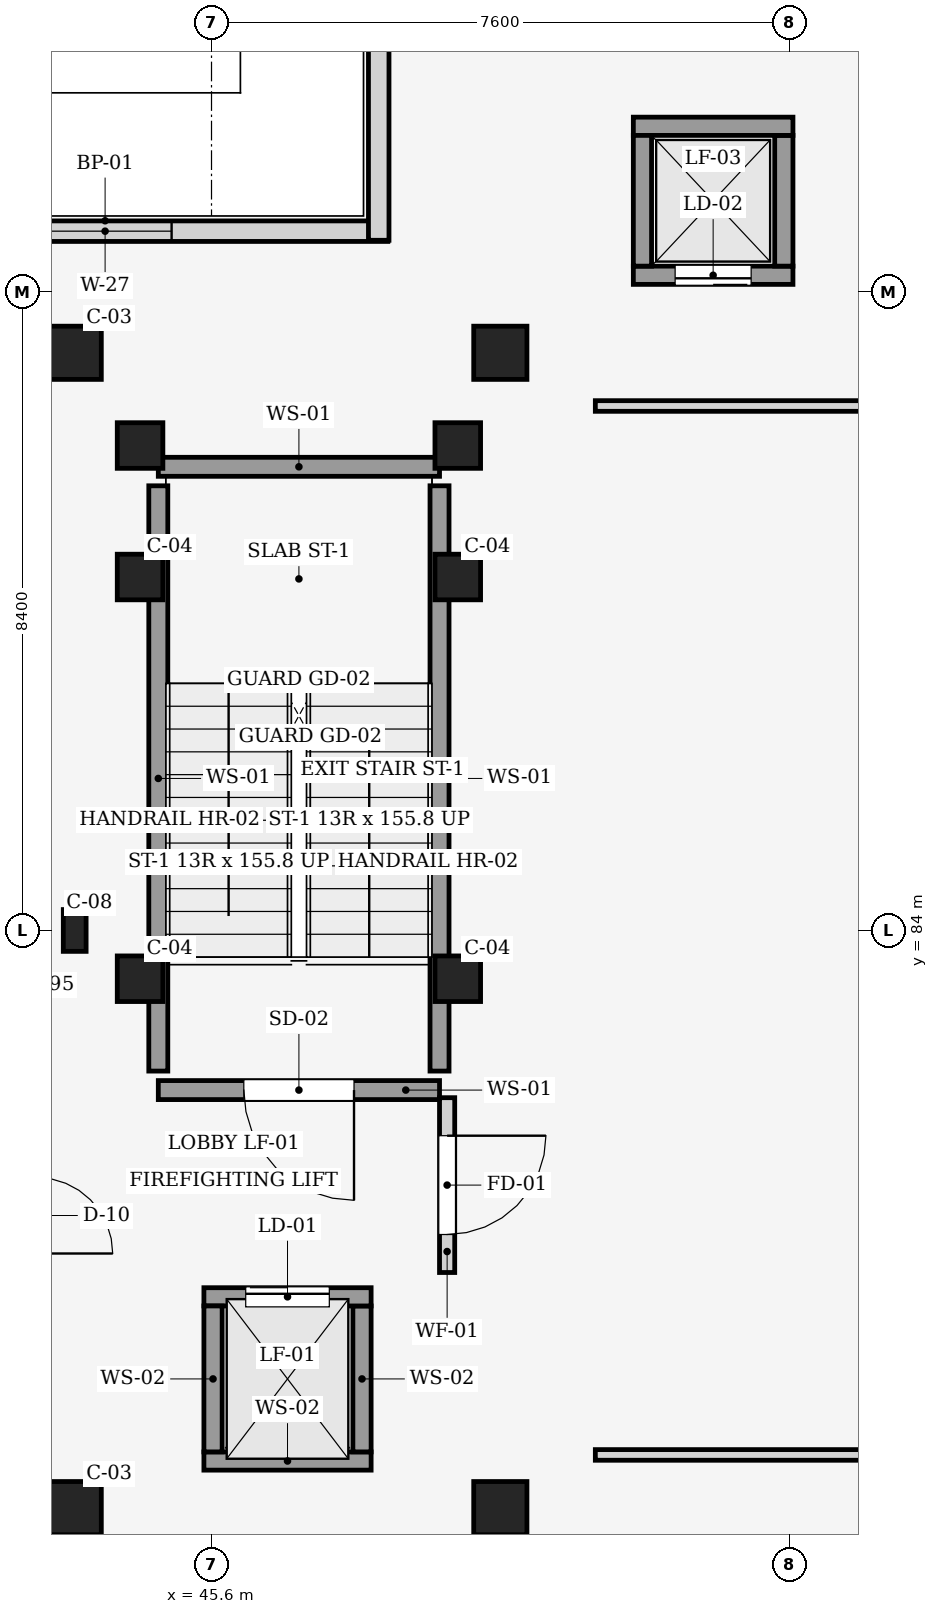
"""IFC4 building model, lengths in metres.
Left out: names, types, materials, properties, quantities, classifications, styles, units other than length and angle.
Written with IfcOpenShell. Run it as: python <this file> out.ifc"""

import sys

from ifc_helpers import new_model, si_unit, direction, frame, frame_2d, origin, origin_2d, place, context, subcontext, project, spatial, rectangle, i_section, extrude, element, fill, save


model = new_model("IFC4")
c1 = context("Model", 3, precision=1e-05, world=origin(), true_north=direction((0.0, 1.0)))
c2 = subcontext(c1, "Body", "Model", "MODEL_VIEW")
j1 = project(units=[si_unit("LENGTHUNIT", "METRE"), si_unit("PLANEANGLEUNIT", "RADIAN")], contexts=[c1])
p1 = place(None, origin())
s1 = spatial("IfcSite", under=j1, at=p1, CompositionType="ELEMENT")
p2 = place(p1, origin())
s2 = spatial("IfcBuilding", under=s1, at=p2, CompositionType="ELEMENT")
p3 = place(p2, frame((0.0, 0.0, 21.3)))
s3 = spatial("IfcBuildingStorey", under=s2, at=p3, CompositionType="ELEMENT", Elevation=21.3)
for number, where, z_axis, x_axis in (
    (1, (43.8, 76.4, 0.0), (0.0, 0.0, 1.0), (1.0, 0.0, 0.0)),
    (2, (43.8, 91.6, 0.0), (0.0, 0.0, 1.0), (1.0, 0.0, 0.0)),
    (3, (49.4, 76.4, 0.0), (0.0, 0.0, 1.0), (1.0, 0.0, 0.0)),
    (4, (49.4, 91.6, 0.0), (0.0, 0.0, 1.0), (1.0, 0.0, 0.0)),
):
    element("IfcColumn", number, at=place(p3, frame(where, z_axis=z_axis, x_axis=x_axis)), inside=s3, PredefinedType="COLUMN", context=c2, shape_type="SweptSolid", body=[
        extrude(rectangle(XDim=0.7, YDim=0.7, at=origin_2d()), origin(), (0.0, 0.0, 1.0), 4.05),
    ])
p4 = place(p3, frame((43.8, 84.0, 0.0), z_axis=(0.0, 0.0, 1.0), x_axis=(1.0, 0.0, 0.0)))
e5 = element("IfcColumn", 5, at=p4, inside=s3, PredefinedType="COLUMN", context=c2, shape_type="SweptSolid", body=[
    extrude(i_section(OverallWidth=0.3, OverallDepth=0.55, WebThickness=0.015, FlangeThickness=0.029, at=origin_2d()), origin(), (0.0, 0.0, 1.0), 4.05),
])
for number, where, z_axis, x_axis in (
    (6, (48.84, 83.365, 0.0), (0.0, 0.0, 1.0), (1.0, 0.0, 0.0)),
    (7, (44.66, 83.365, 0.0), (0.0, 0.0, 1.0), (1.0, 0.0, 0.0)),
    (8, (48.84, 88.65, 0.0), (0.0, 0.0, 1.0), (1.0, 0.0, 0.0)),
    (9, (44.66, 88.65, 0.0), (0.0, 0.0, 1.0), (1.0, 0.0, 0.0)),
    (10, (48.84, 90.38, 0.0), (0.0, 0.0, 1.0), (1.0, 0.0, 0.0)),
    (11, (44.66, 90.38, 0.0), (0.0, 0.0, 1.0), (1.0, 0.0, 0.0)),
):
    element("IfcColumn", number, at=place(p3, frame(where, z_axis=z_axis, x_axis=x_axis)), inside=s3, PredefinedType="COLUMN", context=c2, shape_type="SweptSolid", body=[
        extrude(rectangle(XDim=0.6, YDim=0.6, at=origin_2d()), origin(), (0.0, 0.0, 1.0), 4.05),
    ])
p5 = place(p3, frame((40.48, 93.2, 0.0), z_axis=(0.0, 0.0, 1.0), x_axis=(1.0, 0.0, 0.0)))
e12 = element("IfcWall", 12, at=p5, inside=s3, PredefinedType="STANDARD", context=c2, shape_type="SweptSolid", body=[
    extrude(rectangle(XDim=7.44, YDim=0.27, at=frame_2d((3.72, 0.0))), origin(), (0.0, 0.0, 1.0), 3.015),
])
p6 = place(p5, frame((2.845, 0.0, 0.85)))
e13 = element("IfcOpeningElement", 13, at=p6, cuts=e12, PredefinedType="OPENING", context=c2, shape_type="SweptSolid", body=[
    extrude(rectangle(XDim=1.75, YDim=1.85, at=frame_2d((0.875, 0.925))), frame((0.0, 0.145, 0.0), z_axis=(0.0, -1.0, 0.0), x_axis=(1.0, 0.0, 0.0)), (0.0, 0.0, 1.0), 0.29),
])
p7 = place(p3, frame((47.8, 93.08, 0.0), z_axis=(0.0, 0.0, 1.0), x_axis=(0.0, 1.0, 0.0)))
e14 = element("IfcWall", 14, at=p7, inside=s3, PredefinedType="STANDARD", context=c2, shape_type="SweptSolid", body=[
    extrude(rectangle(XDim=7.44, YDim=0.27, at=frame_2d((3.72, 0.0))), origin(), (0.0, 0.0, 1.0), 3.015),
])
p8 = place(p7, frame((2.72, 0.0, 0.85)))
e15 = element("IfcOpeningElement", 15, at=p8, cuts=e14, PredefinedType="OPENING", context=c2, shape_type="SweptSolid", body=[
    extrude(rectangle(XDim=2.0, YDim=1.85, at=frame_2d((1.0, 0.925))), frame((0.0, 0.145, 0.0), z_axis=(0.0, -1.0, 0.0), x_axis=(1.0, 0.0, 0.0)), (0.0, 0.0, 1.0), 0.29),
])
p9 = place(p3, frame((48.6, 81.9, 0.0), z_axis=(0.0, 0.0, 1.0), x_axis=(-1.0, 0.0, 0.0)))
e16 = element("IfcWall", 16, at=p9, inside=s3, PredefinedType="SHEAR", context=c2, shape_type="SweptSolid", body=[
    extrude(rectangle(XDim=3.7, YDim=0.25, at=frame_2d((1.85, 0.0))), origin(), (0.0, 0.0, 1.0), 4.05),
])
p10 = place(p9, frame((1.125, 0.0, 0.0)))
e17 = element("IfcOpeningElement", 17, at=p10, cuts=e16, PredefinedType="OPENING", context=c2, shape_type="SweptSolid", body=[
    extrude(rectangle(XDim=1.45, YDim=2.2, at=frame_2d((0.725, 1.1))), frame((0.0, 0.135, 0.0), z_axis=(0.0, -1.0, 0.0), x_axis=(1.0, 0.0, 0.0)), (0.0, 0.0, 1.0), 0.27),
])
p11 = place(p3, frame((44.9, 82.15, 0.0), z_axis=(0.0, 0.0, 1.0), x_axis=(0.0, 1.0, 0.0)))
e18 = element("IfcWall", 18, at=p11, inside=s3, PredefinedType="SHEAR", context=c2, shape_type="SweptSolid", body=[
    extrude(rectangle(XDim=7.7, YDim=0.25, at=frame_2d((3.85, 0.0))), origin(), (0.0, 0.0, 1.0), 4.05),
])
p12 = place(p3, frame((44.9, 90.1, 0.0), z_axis=(0.0, 0.0, 1.0), x_axis=(1.0, 0.0, 0.0)))
e19 = element("IfcWall", 19, at=p12, inside=s3, PredefinedType="SHEAR", context=c2, shape_type="SweptSolid", body=[
    extrude(rectangle(XDim=3.7, YDim=0.25, at=frame_2d((1.85, 0.0))), origin(), (0.0, 0.0, 1.0), 4.05),
])
p13 = place(p3, frame((48.6, 89.85, 0.0), z_axis=(0.0, 0.0, 1.0), x_axis=(0.0, -1.0, 0.0)))
e20 = element("IfcWall", 20, at=p13, inside=s3, PredefinedType="SHEAR", context=c2, shape_type="SweptSolid", body=[
    extrude(rectangle(XDim=7.7, YDim=0.25, at=frame_2d((3.85, 0.0))), origin(), (0.0, 0.0, 1.0), 4.05),
])
p14 = place(p3, frame((47.7, 77.02, 0.0), z_axis=(0.0, 0.0, 1.0), x_axis=(-1.0, 0.0, 0.0)))
e21 = element("IfcWall", 21, at=p14, inside=s3, PredefinedType="SHEAR", context=c2, shape_type="SweptSolid", body=[
    extrude(rectangle(XDim=2.2, YDim=0.24, at=frame_2d((1.1, 0.0))), origin(), (0.0, 0.0, 1.0), 4.05),
])
p15 = place(p3, frame((47.58, 79.06, 0.0), z_axis=(0.0, 0.0, 1.0), x_axis=(0.0, -1.0, 0.0)))
e22 = element("IfcWall", 22, at=p15, inside=s3, PredefinedType="SHEAR", context=c2, shape_type="SweptSolid", body=[
    extrude(rectangle(XDim=1.92, YDim=0.24, at=frame_2d((0.96, 0.0))), origin(), (0.0, 0.0, 1.0), 4.05),
])
p16 = place(p3, frame((45.5, 79.18, 0.0), z_axis=(0.0, 0.0, 1.0), x_axis=(1.0, 0.0, 0.0)))
e23 = element("IfcWall", 23, at=p16, inside=s3, PredefinedType="SHEAR", context=c2, shape_type="SweptSolid", body=[
    extrude(rectangle(XDim=2.2, YDim=0.24, at=frame_2d((1.1, 0.0))), origin(), (0.0, 0.0, 1.0), 4.05),
])
p17 = place(p16, frame((0.55, 0.0, 0.0)))
e24 = element("IfcOpeningElement", 24, at=p17, cuts=e23, PredefinedType="OPENING", context=c2, shape_type="SweptSolid", body=[
    extrude(rectangle(XDim=1.1, YDim=2.15, at=frame_2d((0.55, 1.075))), frame((0.0, 0.13, 0.0), z_axis=(0.0, -1.0, 0.0), x_axis=(1.0, 0.0, 0.0)), (0.0, 0.0, 1.0), 0.26),
])
p18 = place(p3, frame((45.62, 77.14, 0.0), z_axis=(0.0, 0.0, 1.0), x_axis=(0.0, 1.0, 0.0)))
e25 = element("IfcWall", 25, at=p18, inside=s3, PredefinedType="SHEAR", context=c2, shape_type="SweptSolid", body=[
    extrude(rectangle(XDim=1.92, YDim=0.24, at=frame_2d((0.96, 0.0))), origin(), (0.0, 0.0, 1.0), 4.05),
])
p19 = place(p3, frame((48.7, 81.8, 0.0), z_axis=(0.0, 0.0, 1.0), x_axis=(0.0, -1.0, 0.0)))
e26 = element("IfcWall", 26, at=p19, inside=s3, PredefinedType="PARTITIONING", context=c2, shape_type="SweptSolid", body=[
    extrude(rectangle(XDim=2.3, YDim=0.2, at=frame_2d((1.15, 0.0))), origin(), (0.0, 0.0, 1.0), 2.9),
])
p20 = place(p19, frame((0.5, 0.0, 0.0)))
e27 = element("IfcOpeningElement", 27, at=p20, cuts=e26, PredefinedType="OPENING", context=c2, shape_type="SweptSolid", body=[
    extrude(rectangle(XDim=1.3, YDim=2.2, at=frame_2d((0.65, 1.1))), frame((0.0, 0.11, 0.0), z_axis=(0.0, -1.0, 0.0), x_axis=(1.0, 0.0, 0.0)), (0.0, 0.0, 1.0), 0.22),
])
p21 = place(p3, frame((53.25, 92.62, 0.0), z_axis=(0.0, 0.0, 1.0), x_axis=(-1.0, 0.0, 0.0)))
e28 = element("IfcWall", 28, at=p21, inside=s3, PredefinedType="SHEAR", context=c2, shape_type="SweptSolid", body=[
    extrude(rectangle(XDim=2.1, YDim=0.24, at=frame_2d((1.05, 0.0))), origin(), (0.0, 0.0, 1.0), 4.05),
])
p22 = place(p21, frame((0.55, 0.0, 0.0)))
e29 = element("IfcOpeningElement", 29, at=p22, cuts=e28, PredefinedType="OPENING", context=c2, shape_type="SweptSolid", body=[
    extrude(rectangle(XDim=1.0, YDim=2.15, at=frame_2d((0.5, 1.075))), frame((0.0, 0.13, 0.0), z_axis=(0.0, -1.0, 0.0), x_axis=(1.0, 0.0, 0.0)), (0.0, 0.0, 1.0), 0.26),
])
p23 = place(p3, frame((53.13, 94.46, 0.0), z_axis=(0.0, 0.0, 1.0), x_axis=(0.0, -1.0, 0.0)))
e30 = element("IfcWall", 30, at=p23, inside=s3, PredefinedType="SHEAR", context=c2, shape_type="SweptSolid", body=[
    extrude(rectangle(XDim=1.72, YDim=0.24, at=frame_2d((0.86, 0.0))), origin(), (0.0, 0.0, 1.0), 4.05),
])
p24 = place(p3, frame((51.15, 94.58, 0.0), z_axis=(0.0, 0.0, 1.0), x_axis=(1.0, 0.0, 0.0)))
e31 = element("IfcWall", 31, at=p24, inside=s3, PredefinedType="SHEAR", context=c2, shape_type="SweptSolid", body=[
    extrude(rectangle(XDim=2.1, YDim=0.24, at=frame_2d((1.05, 0.0))), origin(), (0.0, 0.0, 1.0), 4.05),
])
p25 = place(p3, frame((51.27, 92.74, 0.0), z_axis=(0.0, 0.0, 1.0), x_axis=(0.0, 1.0, 0.0)))
e32 = element("IfcWall", 32, at=p25, inside=s3, PredefinedType="SHEAR", context=c2, shape_type="SweptSolid", body=[
    extrude(rectangle(XDim=1.72, YDim=0.24, at=frame_2d((0.86, 0.0))), origin(), (0.0, 0.0, 1.0), 4.05),
])
p26 = place(p3, frame((63.35, 77.1, 0.0), z_axis=(0.0, 0.0, 1.0), x_axis=(-1.0, 0.0, 0.0)))
e33 = element("IfcWall", 33, at=p26, inside=s3, PredefinedType="PARTITIONING", context=c2, shape_type="SweptSolid", body=[
    extrude(rectangle(XDim=12.7, YDim=0.14, at=frame_2d((6.35, 0.0))), origin(), (0.0, 0.0, 1.0), 3.7),
])
p27 = place(p26, frame((5.675, 0.0, 0.0)))
e34 = element("IfcOpeningElement", 34, at=p27, cuts=e33, PredefinedType="OPENING", context=c2, shape_type="SweptSolid", body=[
    extrude(rectangle(XDim=1.35, YDim=2.1, at=frame_2d((0.675, 1.05))), frame((0.0, 0.08, 0.0), z_axis=(0.0, -1.0, 0.0), x_axis=(1.0, 0.0, 0.0)), (0.0, 0.0, 1.0), 0.16),
])
p28 = place(p3, frame((50.65, 90.9, 0.0), z_axis=(0.0, 0.0, 1.0), x_axis=(1.0, 0.0, 0.0)))
e35 = element("IfcWall", 35, at=p28, inside=s3, PredefinedType="PARTITIONING", context=c2, shape_type="SweptSolid", body=[
    extrude(rectangle(XDim=12.7, YDim=0.14, at=frame_2d((6.35, 0.0))), origin(), (0.0, 0.0, 1.0), 3.7),
])
p29 = place(p6, origin())
e36 = element("IfcWindow", 36, at=p29, inside=s3, PartitioningType="SINGLE_PANEL", PredefinedType="WINDOW", context=c2, shape_type="SweptSolid", body=[
    extrude(rectangle(XDim=1.75, YDim=1.85, at=frame_2d((0.875, 0.925))), frame((0.0, 0.03, 0.0), z_axis=(0.0, -1.0, 0.0), x_axis=(1.0, 0.0, 0.0)), (0.0, 0.0, 1.0), 0.06),
])
fill(e13, e36)
p30 = place(p10, origin())
e37 = element("IfcDoor", 37, at=p30, inside=s3, OperationType="SINGLE_SWING_LEFT", PredefinedType="DOOR", context=c2, shape_type="SweptSolid", body=[
    extrude(rectangle(XDim=1.45, YDim=2.2, at=frame_2d((0.725, 1.1))), frame((0.0, 0.025, 0.0), z_axis=(0.0, -1.0, 0.0), x_axis=(1.0, 0.0, 0.0)), (0.0, 0.0, 1.0), 0.05),
])
fill(e17, e37)
p31 = place(p17, origin())
e38 = element("IfcDoor", 38, at=p31, inside=s3, OperationType="SLIDING_TO_LEFT", PredefinedType="DOOR", context=c2, shape_type="SweptSolid", body=[
    extrude(rectangle(XDim=1.1, YDim=2.15, at=frame_2d((0.55, 1.075))), frame((0.0, 0.025, 0.0), z_axis=(0.0, -1.0, 0.0), x_axis=(1.0, 0.0, 0.0)), (0.0, 0.0, 1.0), 0.05),
])
fill(e24, e38)
p32 = place(p20, origin())
e39 = element("IfcDoor", 39, at=p32, inside=s3, OperationType="SINGLE_SWING_LEFT", PredefinedType="DOOR", context=c2, shape_type="SweptSolid", body=[
    extrude(rectangle(XDim=1.3, YDim=2.2, at=frame_2d((0.65, 1.1))), frame((0.0, 0.025, 0.0), z_axis=(0.0, -1.0, 0.0), x_axis=(1.0, 0.0, 0.0)), (0.0, 0.0, 1.0), 0.05),
])
fill(e27, e39)
p33 = place(p22, origin())
e40 = element("IfcDoor", 40, at=p33, inside=s3, OperationType="SLIDING_TO_LEFT", PredefinedType="DOOR", context=c2, shape_type="SweptSolid", body=[
    extrude(rectangle(XDim=1.0, YDim=2.15, at=frame_2d((0.5, 1.075))), frame((0.0, 0.025, 0.0), z_axis=(0.0, -1.0, 0.0), x_axis=(1.0, 0.0, 0.0)), (0.0, 0.0, 1.0), 0.05),
])
fill(e29, e40)
save(model, sys.argv[1])
